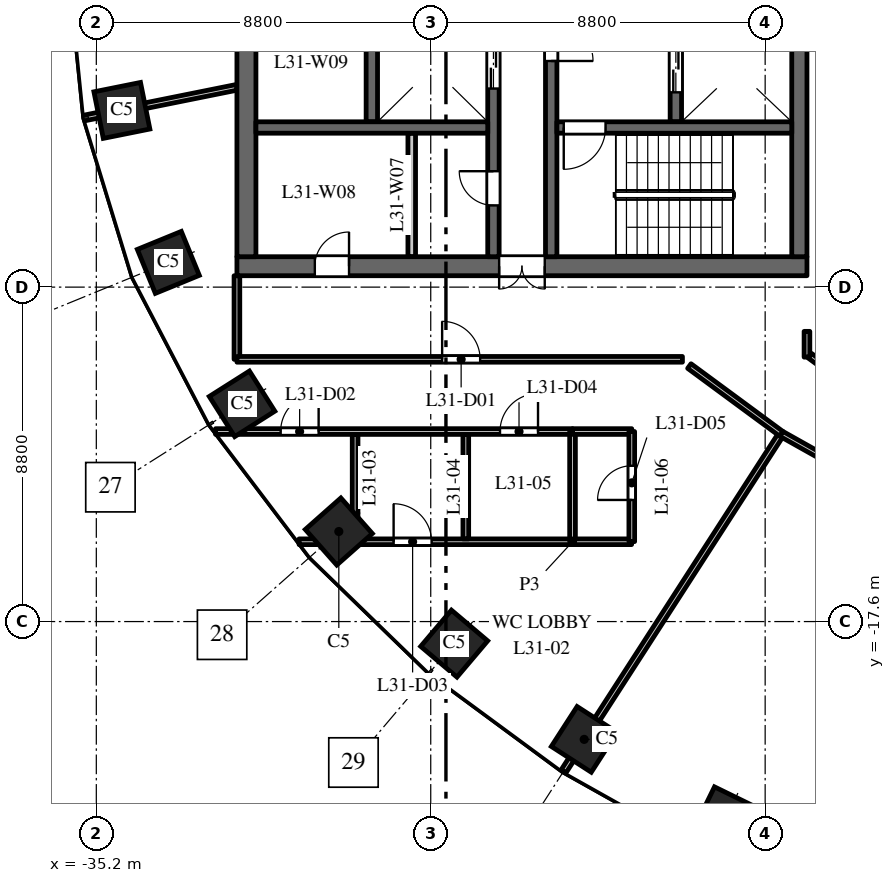
"""IFC4 building model, lengths in metres.
Left out: names, types, materials, properties, quantities, classifications, styles, units other than length and angle.
Written with IfcOpenShell. Run it as: python <this file> out.ifc"""

import sys

from ifc_helpers import new_model, si_unit, direction, frame, frame_2d, origin, origin_2d, place, context, subcontext, project, spatial, rectangle, extrude, element, fill, save


model = new_model("IFC4")
c1 = context("Model", 3, precision=1e-05, world=origin(), true_north=direction((0.0, 1.0)))
c2 = subcontext(c1, "Body", "Model", "MODEL_VIEW")
j1 = project(units=[si_unit("LENGTHUNIT", "METRE"), si_unit("PLANEANGLEUNIT", "RADIAN")], contexts=[c1])
p1 = place(None, origin())
s1 = spatial("IfcSite", under=j1, at=p1, CompositionType="ELEMENT")
p2 = place(p1, origin())
s2 = spatial("IfcBuilding", under=s1, at=p2, CompositionType="ELEMENT")
p3 = place(p2, frame((0.0, 0.0, 136.0)))
s3 = spatial("IfcBuildingStorey", under=s2, at=p3, CompositionType="ELEMENT", Elevation=136.0)
for number, where, z_axis, x_axis in (
    (1, (-34.527, -4.151, 0.0), (0.0, 0.0, 1.0), (0.197, -0.98, 0.0)),
    (2, (-33.305, -8.149, 0.0), (0.0, 0.0, 1.0), (0.379, -0.925, 0.0)),
    (3, (-31.365, -11.871, 0.0), (0.0, 0.0, 1.0), (0.535, -0.845, 0.0)),
    (4, (-28.819, -15.23, 0.0), (0.0, 0.0, 1.0), (0.663, -0.749, 0.0)),
    (5, (-25.783, -18.18, 0.0), (0.0, 0.0, 1.0), (0.763, -0.646, 0.0)),
    (6, (-22.362, -20.7, 0.0), (0.0, 0.0, 1.0), (0.84, -0.542, 0.0)),
    (7, (-18.646, -22.785, 0.0), (0.0, 0.0, 1.0), (0.898, -0.439, 0.0)),
):
    element("IfcColumn", number, at=place(p3, frame(where, z_axis=z_axis, x_axis=x_axis)), inside=s3, PredefinedType="COLUMN", context=c2, shape_type="SweptSolid", body=[
        extrude(rectangle(XDim=1.25, YDim=1.25, at=origin_2d()), origin(), (0.0, 0.0, 1.0), 4.0),
    ])
p4 = place(p3, frame((-16.5, -8.25, 0.0), z_axis=(0.0, 0.0, 1.0), x_axis=(-1.0, 0.0, 0.0)))
e8 = element("IfcWall", 8, at=p4, inside=s3, PredefinedType="SHEAR", context=c2, shape_type="SweptSolid", body=[
    extrude(rectangle(XDim=15.0, YDim=0.5, at=frame_2d((7.5, 0.0))), origin(), (0.0, 0.0, 1.0), 3.7),
])
p5 = place(p4, frame((6.9, 0.0, 0.0)))
e9 = element("IfcOpeningElement", 9, at=p5, cuts=e8, PredefinedType="OPENING", context=c2, shape_type="SweptSolid", body=[
    extrude(rectangle(XDim=1.2, YDim=2.1, at=frame_2d((0.6, 1.05))), frame((0.0, 0.26, 0.0), z_axis=(0.0, -1.0, 0.0), x_axis=(1.0, 0.0, 0.0)), (0.0, 0.0, 1.0), 0.52),
])
p6 = place(p4, frame((12.05, 0.0, 0.0)))
e10 = element("IfcOpeningElement", 10, at=p6, cuts=e8, PredefinedType="OPENING", context=c2, shape_type="SweptSolid", body=[
    extrude(rectangle(XDim=0.9, YDim=2.1, at=frame_2d((0.45, 1.05))), frame((0.0, 0.26, 0.0), z_axis=(0.0, -1.0, 0.0), x_axis=(1.0, 0.0, 0.0)), (0.0, 0.0, 1.0), 0.52),
])
p7 = place(p3, frame((-27.95, -4.45, 0.0), z_axis=(0.0, 0.0, 1.0), x_axis=(0.0, 1.0, 0.0)))
e11 = element("IfcWall", 11, at=p7, inside=s3, PredefinedType="SHEAR", context=c2, shape_type="SweptSolid", body=[
    extrude(rectangle(XDim=8.9, YDim=0.3, at=frame_2d((4.45, 0.0))), origin(), (0.0, 0.0, 1.0), 3.7),
])
p8 = place(p3, frame((-19.95, -4.45, 0.0), z_axis=(0.0, 0.0, 1.0), x_axis=(0.0, 1.0, 0.0)))
e12 = element("IfcWall", 12, at=p8, inside=s3, PredefinedType="SHEAR", context=c2, shape_type="SweptSolid", body=[
    extrude(rectangle(XDim=8.9, YDim=0.3, at=frame_2d((4.45, 0.0))), origin(), (0.0, 0.0, 1.0), 3.7),
])
p9 = place(p8, frame((0.775, 0.0, 0.0)))
e13 = element("IfcOpeningElement", 13, at=p9, cuts=e12, PredefinedType="OPENING", context=c2, shape_type="SweptSolid", body=[
    extrude(rectangle(XDim=1.2, YDim=2.1, at=frame_2d((0.6, 1.05))), frame((0.0, 0.16, 0.0), z_axis=(0.0, -1.0, 0.0), x_axis=(1.0, 0.0, 0.0)), (0.0, 0.0, 1.0), 0.32),
])
p10 = place(p8, frame((7.35, 0.0, 0.0)))
e14 = element("IfcOpeningElement", 14, at=p10, cuts=e12, PredefinedType="OPENING", context=c2, shape_type="SweptSolid", body=[
    extrude(rectangle(XDim=0.9, YDim=2.1, at=frame_2d((0.45, 1.05))), frame((0.0, 0.16, 0.0), z_axis=(0.0, -1.0, 0.0), x_axis=(1.0, 0.0, 0.0)), (0.0, 0.0, 1.0), 0.32),
])
p11 = place(p3, frame((-24.75, -8.0, 0.0), z_axis=(0.0, 0.0, 1.0), x_axis=(0.0, 1.0, 0.0)))
e15 = element("IfcWall", 15, at=p11, inside=s3, PredefinedType="SHEAR", context=c2, shape_type="SweptSolid", body=[
    extrude(rectangle(XDim=16.0, YDim=0.3, at=frame_2d((8.0, 0.0))), origin(), (0.0, 0.0, 1.0), 3.7),
])
p12 = place(p11, frame((4.425, 0.0, 0.0)))
e16 = element("IfcOpeningElement", 16, at=p12, cuts=e15, PredefinedType="OPENING", context=c2, shape_type="SweptSolid", body=[
    extrude(rectangle(XDim=1.1, YDim=2.1, at=frame_2d((0.55, 1.05))), frame((0.0, 0.16, 0.0), z_axis=(0.0, -1.0, 0.0), x_axis=(1.0, 0.0, 0.0)), (0.0, 0.0, 1.0), 0.32),
])
p13 = place(p11, frame((7.45, 0.0, 0.0)))
e17 = element("IfcOpeningElement", 17, at=p13, cuts=e15, PredefinedType="OPENING", context=c2, shape_type="SweptSolid", body=[
    extrude(rectangle(XDim=1.1, YDim=2.1, at=frame_2d((0.55, 1.05))), frame((0.0, 0.16, 0.0), z_axis=(0.0, -1.0, 0.0), x_axis=(1.0, 0.0, 0.0)), (0.0, 0.0, 1.0), 0.32),
])
p14 = place(p11, frame((10.425, 0.0, 0.0)))
e18 = element("IfcOpeningElement", 18, at=p14, cuts=e15, PredefinedType="OPENING", context=c2, shape_type="SweptSolid", body=[
    extrude(rectangle(XDim=1.2, YDim=2.1, at=frame_2d((0.6, 1.05))), frame((0.0, 0.16, 0.0), z_axis=(0.0, -1.0, 0.0), x_axis=(1.0, 0.0, 0.0)), (0.0, 0.0, 1.0), 0.32),
])
p15 = place(p11, frame((13.75, 0.0, 0.0)))
e19 = element("IfcOpeningElement", 19, at=p15, cuts=e15, PredefinedType="OPENING", context=c2, shape_type="SweptSolid", body=[
    extrude(rectangle(XDim=0.9, YDim=2.1, at=frame_2d((0.45, 1.05))), frame((0.0, 0.16, 0.0), z_axis=(0.0, -1.0, 0.0), x_axis=(1.0, 0.0, 0.0)), (0.0, 0.0, 1.0), 0.32),
])
p16 = place(p11, frame((1.35, 0.0, 0.0)))
e20 = element("IfcOpeningElement", 20, at=p16, cuts=e15, PredefinedType="OPENING", context=c2, shape_type="SweptSolid", body=[
    extrude(rectangle(XDim=0.9, YDim=2.1, at=frame_2d((0.45, 1.05))), frame((0.0, 0.16, 0.0), z_axis=(0.0, -1.0, 0.0), x_axis=(1.0, 0.0, 0.0)), (0.0, 0.0, 1.0), 0.32),
])
p17 = place(p3, frame((-16.7, -8.0, 0.0), z_axis=(0.0, 0.0, 1.0), x_axis=(0.0, 1.0, 0.0)))
e21 = element("IfcWall", 21, at=p17, inside=s3, PredefinedType="SHEAR", context=c2, shape_type="SweptSolid", body=[
    extrude(rectangle(XDim=16.0, YDim=0.4, at=frame_2d((8.0, 0.0))), origin(), (0.0, 0.0, 1.0), 3.7),
])
p18 = place(p3, frame((-31.25, -8.0, 0.0), z_axis=(0.0, 0.0, 1.0), x_axis=(0.0, 1.0, 0.0)))
e22 = element("IfcWall", 22, at=p18, inside=s3, PredefinedType="SHEAR", context=c2, shape_type="SweptSolid", body=[
    extrude(rectangle(XDim=16.0, YDim=0.5, at=frame_2d((8.0, 0.0))), origin(), (0.0, 0.0, 1.0), 3.7),
])
p19 = place(p3, frame((-26.9, -8.0, 0.0), z_axis=(0.0, 0.0, 1.0), x_axis=(0.0, 1.0, 0.0)))
e23 = element("IfcWall", 23, at=p19, inside=s3, PredefinedType="PARTITIONING", context=c2, shape_type="SweptSolid", body=[
    extrude(rectangle(XDim=3.25, YDim=0.2, at=frame_2d((1.625, 0.0))), origin(), (0.0, 0.0, 1.0), 3.7),
])
p20 = place(p3, frame((-24.9, -4.6, 0.0), z_axis=(0.0, 0.0, 1.0), x_axis=(-1.0, 0.0, 0.0)))
e24 = element("IfcWall", 24, at=p20, inside=s3, PredefinedType="SHEAR", context=c2, shape_type="SweptSolid", body=[
    extrude(rectangle(XDim=6.1, YDim=0.3, at=frame_2d((3.05, 0.0))), origin(), (0.0, 0.0, 1.0), 3.7),
])
p21 = place(p3, frame((-23.23, -8.0, 0.0), z_axis=(0.0, 0.0, 1.0), x_axis=(0.0, 1.0, 0.0)))
e25 = element("IfcWall", 25, at=p21, inside=s3, PredefinedType="SHEAR", context=c2, shape_type="SweptSolid", body=[
    extrude(rectangle(XDim=7.875, YDim=0.3, at=frame_2d((3.938, 0.0))), origin(), (0.0, 0.0, 1.0), 3.7),
])
p22 = place(p21, frame((5.15, 0.0, 0.0)))
e26 = element("IfcOpeningElement", 26, at=p22, cuts=e25, PredefinedType="OPENING", context=c2, shape_type="SweptSolid", body=[
    extrude(rectangle(XDim=1.1, YDim=2.1, at=frame_2d((0.55, 1.05))), frame((0.0, 0.16, 0.0), z_axis=(0.0, -1.0, 0.0), x_axis=(1.0, 0.0, 0.0)), (0.0, 0.0, 1.0), 0.32),
])
p23 = place(p3, frame((-16.9, -4.6, 0.0), z_axis=(0.0, 0.0, 1.0), x_axis=(-1.0, 0.0, 0.0)))
e27 = element("IfcWall", 27, at=p23, inside=s3, PredefinedType="SHEAR", context=c2, shape_type="SweptSolid", body=[
    extrude(rectangle(XDim=6.18, YDim=0.3, at=frame_2d((3.09, 0.0))), origin(), (0.0, 0.0, 1.0), 3.7),
])
p24 = place(p23, frame((4.9, 0.0, 0.0)))
e28 = element("IfcOpeningElement", 28, at=p24, cuts=e27, PredefinedType="OPENING", context=c2, shape_type="SweptSolid", body=[
    extrude(rectangle(XDim=1.1, YDim=2.1, at=frame_2d((0.55, 1.05))), frame((0.0, 0.16, 0.0), z_axis=(0.0, -1.0, 0.0), x_axis=(1.0, 0.0, 0.0)), (0.0, 0.0, 1.0), 0.32),
])
p25 = place(p3, frame((-35.512, -4.349, 0.0), z_axis=(0.0, 0.0, 1.0), x_axis=(0.980357474535, 0.197228857227, 0.0)))
e29 = element("IfcWall", 29, at=p25, inside=s3, PredefinedType="PARTITIONING", context=c2, shape_type="SweptSolid", body=[
    extrude(rectangle(XDim=4.092, YDim=0.15, at=frame_2d((2.046, 0.0))), origin(), (0.0, 0.0, 1.0), 3.2),
])
p26 = place(p3, frame((-32.063, -12.6, 0.0), z_axis=(0.0, 0.0, 1.0), x_axis=(1.0, 0.0, 0.0)))
e30 = element("IfcWall", 30, at=p26, inside=s3, PredefinedType="PARTITIONING", context=c2, shape_type="SweptSolid", body=[
    extrude(rectangle(XDim=9.394, YDim=0.15, at=frame_2d((4.697, 0.0))), origin(), (0.0, 0.0, 1.0), 2.9),
])
p27 = place(p26, frame((1.713, 0.0, 0.0)))
e31 = element("IfcOpeningElement", 31, at=p27, cuts=e30, PredefinedType="OPENING", context=c2, shape_type="SweptSolid", body=[
    extrude(rectangle(XDim=1.0, YDim=2.1, at=frame_2d((0.5, 1.05))), frame((0.0, 0.085, 0.0), z_axis=(0.0, -1.0, 0.0), x_axis=(1.0, 0.0, 0.0)), (0.0, 0.0, 1.0), 0.17),
])
p28 = place(p26, frame((7.486, 0.0, 0.0)))
e32 = element("IfcOpeningElement", 32, at=p28, cuts=e30, PredefinedType="OPENING", context=c2, shape_type="SweptSolid", body=[
    extrude(rectangle(XDim=1.0, YDim=2.1, at=frame_2d((0.5, 1.05))), frame((0.0, 0.085, 0.0), z_axis=(0.0, -1.0, 0.0), x_axis=(1.0, 0.0, 0.0)), (0.0, 0.0, 1.0), 0.17),
])
p29 = place(p3, frame((-31.5, -10.7, 0.0), z_axis=(0.0, 0.0, 1.0), x_axis=(0.0, 1.0, 0.0)))
e33 = element("IfcWall", 33, at=p29, inside=s3, PredefinedType="PARTITIONING", context=c2, shape_type="SweptSolid", body=[
    extrude(rectangle(XDim=2.2, YDim=0.15, at=frame_2d((1.1, 0.0))), origin(), (0.0, 0.0, 1.0), 3.7),
])
p30 = place(p3, frame((-31.5, -10.7, 0.0), z_axis=(0.0, 0.0, 1.0), x_axis=(1.0, 0.0, 0.0)))
e34 = element("IfcWall", 34, at=p30, inside=s3, PredefinedType="PARTITIONING", context=c2, shape_type="SweptSolid", body=[
    extrude(rectangle(XDim=11.723, YDim=0.15, at=frame_2d((5.861, 0.0))), origin(), (0.0, 0.0, 1.0), 3.1),
])
p31 = place(p30, frame((5.4, 0.0, 0.0)))
e35 = element("IfcOpeningElement", 35, at=p31, cuts=e34, PredefinedType="OPENING", context=c2, shape_type="SweptSolid", body=[
    extrude(rectangle(XDim=1.0, YDim=2.1, at=frame_2d((0.5, 1.05))), frame((0.0, 0.085, 0.0), z_axis=(0.0, -1.0, 0.0), x_axis=(1.0, 0.0, 0.0)), (0.0, 0.0, 1.0), 0.17),
])
p32 = place(p3, frame((-29.865, -15.5, 0.0), z_axis=(0.0, 0.0, 1.0), x_axis=(1.0, 0.0, 0.0)))
e36 = element("IfcWall", 36, at=p32, inside=s3, PredefinedType="PARTITIONING", context=c2, shape_type="SweptSolid", body=[
    extrude(rectangle(XDim=7.196, YDim=0.15, at=frame_2d((3.598, 0.0))), origin(), (0.0, 0.0, 1.0), 2.9),
])
p33 = place(p32, frame((2.488, 0.0, 0.0)))
e37 = element("IfcOpeningElement", 37, at=p33, cuts=e36, PredefinedType="OPENING", context=c2, shape_type="SweptSolid", body=[
    extrude(rectangle(XDim=1.0, YDim=2.1, at=frame_2d((0.5, 1.05))), frame((0.0, 0.085, 0.0), z_axis=(0.0, -1.0, 0.0), x_axis=(1.0, 0.0, 0.0)), (0.0, 0.0, 1.0), 0.17),
])
p34 = place(p3, frame((-28.39, -15.425, 0.0), z_axis=(0.0, 0.0, 1.0), x_axis=(0.0, 1.0, 0.0)))
e38 = element("IfcWall", 38, at=p34, inside=s3, PredefinedType="PARTITIONING", context=c2, shape_type="SweptSolid", body=[
    extrude(rectangle(XDim=2.75, YDim=0.15, at=frame_2d((1.375, 0.0))), origin(), (0.0, 0.0, 1.0), 2.9),
])
p35 = place(p3, frame((-25.477, -15.425, 0.0), z_axis=(0.0, 0.0, 1.0), x_axis=(0.0, 1.0, 0.0)))
e39 = element("IfcWall", 39, at=p35, inside=s3, PredefinedType="PARTITIONING", context=c2, shape_type="SweptSolid", body=[
    extrude(rectangle(XDim=2.75, YDim=0.15, at=frame_2d((1.375, 0.0))), origin(), (0.0, 0.0, 1.0), 3.7),
])
p36 = place(p3, frame((-22.905, -21.542, 0.0), z_axis=(0.0, 0.0, 1.0), x_axis=(0.542214233103, 0.840240278385, 0.0)))
e40 = element("IfcWall", 40, at=p36, inside=s3, PredefinedType="PARTITIONING", context=c2, shape_type="SweptSolid", body=[
    extrude(rectangle(XDim=10.566, YDim=0.15, at=frame_2d((5.283, 0.0))), origin(), (0.0, 0.0, 1.0), 2.9),
])
p37 = place(p3, frame((-22.669, -15.5, 0.0), z_axis=(0.0, 0.0, 1.0), x_axis=(0.0, 1.0, 0.0)))
e41 = element("IfcWall", 41, at=p37, inside=s3, PredefinedType="PARTITIONING", context=c2, shape_type="SweptSolid", body=[
    extrude(rectangle(XDim=2.9, YDim=0.15, at=frame_2d((1.45, 0.0))), origin(), (0.0, 0.0, 1.0), 3.7),
])
p38 = place(p3, frame((-22.669, -15.5, 0.0), z_axis=(0.0, 0.0, 1.0), x_axis=(1.0, 0.0, 0.0)))
e42 = element("IfcWall", 42, at=p38, inside=s3, PredefinedType="PARTITIONING", context=c2, shape_type="SweptSolid", body=[
    extrude(rectangle(XDim=1.555, YDim=0.15, at=frame_2d((0.777, 0.0))), origin(), (0.0, 0.0, 1.0), 2.75),
])
p39 = place(p3, frame((-22.669, -12.6, 0.0), z_axis=(0.0, 0.0, 1.0), x_axis=(1.0, 0.0, 0.0)))
e43 = element("IfcWall", 43, at=p39, inside=s3, PredefinedType="PARTITIONING", context=c2, shape_type="SweptSolid", body=[
    extrude(rectangle(XDim=1.559, YDim=0.15, at=frame_2d((0.779, 0.0))), origin(), (0.0, 0.0, 1.0), 3.7),
])
p40 = place(p3, frame((-21.11, -15.496, 0.0), z_axis=(0.0, 0.0, 1.0), x_axis=(0.0, 1.0, 0.0)))
e44 = element("IfcWall", 44, at=p40, inside=s3, PredefinedType="PARTITIONING", context=c2, shape_type="SweptSolid", body=[
    extrude(rectangle(XDim=2.896, YDim=0.15, at=frame_2d((1.448, 0.0))), origin(), (0.0, 0.0, 1.0), 2.75),
])
p41 = place(p40, frame((1.096, 0.0, 0.0)))
e45 = element("IfcOpeningElement", 45, at=p41, cuts=e44, PredefinedType="OPENING", context=c2, shape_type="SweptSolid", body=[
    extrude(rectangle(XDim=0.9, YDim=2.1, at=frame_2d((0.45, 1.05))), frame((0.0, 0.085, 0.0), z_axis=(0.0, -1.0, 0.0), x_axis=(1.0, 0.0, 0.0)), (0.0, 0.0, 1.0), 0.17),
])
p42 = place(p3, frame((-19.595, -10.877, 0.0), z_axis=(0.0, 0.0, 1.0), x_axis=(0.805151708762, -0.593068904831, 0.0)))
e46 = element("IfcWall", 46, at=p42, inside=s3, PredefinedType="PARTITIONING", context=c2, shape_type="SweptSolid", body=[
    extrude(rectangle(XDim=3.008, YDim=0.15, at=frame_2d((1.504, 0.0))), origin(), (0.0, 0.0, 1.0), 2.75),
])
p43 = place(p3, frame((-17.173, -12.661, 0.0), z_axis=(0.0, 0.0, 1.0), x_axis=(0.872054495499, -0.489408783003, 0.0)))
e47 = element("IfcWall", 47, at=p43, inside=s3, PredefinedType="PARTITIONING", context=c2, shape_type="SweptSolid", body=[
    extrude(rectangle(XDim=3.128, YDim=0.15, at=frame_2d((1.564, 0.0))), origin(), (0.0, 0.0, 1.0), 3.7),
])
p44 = place(p3, frame((-16.5, -10.642, 0.0), z_axis=(0.0, 0.0, 1.0), x_axis=(0.0, 1.0, 0.0)))
e48 = element("IfcWall", 48, at=p44, inside=s3, PredefinedType="PARTITIONING", context=c2, shape_type="SweptSolid", body=[
    extrude(rectangle(XDim=0.678, YDim=0.15, at=frame_2d((0.339, 0.0))), origin(), (0.0, 0.0, 1.0), 3.7),
])
p45 = place(p3, frame((-16.425, -10.604, 0.0), z_axis=(0.0, 0.0, 1.0), x_axis=(0.805608867586, -0.592447763492, 0.0)))
e49 = element("IfcWall", 49, at=p45, inside=s3, PredefinedType="PARTITIONING", context=c2, shape_type="SweptSolid", body=[
    extrude(rectangle(XDim=0.488, YDim=0.15, at=frame_2d((0.244, 0.0))), origin(), (0.0, 0.0, 1.0), 3.7),
])
p46 = place(p9, origin())
e50 = element("IfcDoor", 50, at=p46, inside=s3, OperationType="DOUBLE_DOOR_SLIDING", PredefinedType="DOOR", context=c2, shape_type="SweptSolid", body=[
    extrude(rectangle(XDim=1.2, YDim=2.1, at=frame_2d((0.6, 1.05))), frame((0.0, 0.025, 0.0), z_axis=(0.0, -1.0, 0.0), x_axis=(1.0, 0.0, 0.0)), (0.0, 0.0, 1.0), 0.05),
])
fill(e13, e50)
p47 = place(p12, origin())
e51 = element("IfcDoor", 51, at=p47, inside=s3, OperationType="DOUBLE_DOOR_SLIDING", PredefinedType="DOOR", context=c2, shape_type="SweptSolid", body=[
    extrude(rectangle(XDim=1.1, YDim=2.1, at=frame_2d((0.55, 1.05))), frame((0.0, 0.025, 0.0), z_axis=(0.0, -1.0, 0.0), x_axis=(1.0, 0.0, 0.0)), (0.0, 0.0, 1.0), 0.05),
])
fill(e16, e51)
p48 = place(p24, origin())
e52 = element("IfcDoor", 52, at=p48, inside=s3, OperationType="SINGLE_SWING_LEFT", PredefinedType="DOOR", context=c2, shape_type="SweptSolid", body=[
    extrude(rectangle(XDim=1.1, YDim=2.1, at=frame_2d((0.55, 1.05))), frame((0.0, 0.025, 0.0), z_axis=(0.0, -1.0, 0.0), x_axis=(1.0, 0.0, 0.0)), (0.0, 0.0, 1.0), 0.05),
])
fill(e28, e52)
p49 = place(p22, origin())
e53 = element("IfcDoor", 53, at=p49, inside=s3, OperationType="SINGLE_SWING_LEFT", PredefinedType="DOOR", context=c2, shape_type="SweptSolid", body=[
    extrude(rectangle(XDim=1.1, YDim=2.1, at=frame_2d((0.55, 1.05))), frame((0.0, 0.025, 0.0), z_axis=(0.0, -1.0, 0.0), x_axis=(1.0, 0.0, 0.0)), (0.0, 0.0, 1.0), 0.05),
])
fill(e26, e53)
p50 = place(p5, origin())
e54 = element("IfcDoor", 54, at=p50, inside=s3, OperationType="DOUBLE_DOOR_DOUBLE_SWING", PredefinedType="DOOR", context=c2, shape_type="SweptSolid", body=[
    extrude(rectangle(XDim=1.2, YDim=2.1, at=frame_2d((0.6, 1.05))), frame((0.0, 0.025, 0.0), z_axis=(0.0, -1.0, 0.0), x_axis=(1.0, 0.0, 0.0)), (0.0, 0.0, 1.0), 0.05),
])
fill(e9, e54)
p51 = place(p16, origin())
e55 = element("IfcDoor", 55, at=p51, inside=s3, OperationType="SINGLE_SWING_LEFT", PredefinedType="DOOR", context=c2, shape_type="SweptSolid", body=[
    extrude(rectangle(XDim=0.9, YDim=2.1, at=frame_2d((0.45, 1.05))), frame((0.0, 0.025, 0.0), z_axis=(0.0, -1.0, 0.0), x_axis=(1.0, 0.0, 0.0)), (0.0, 0.0, 1.0), 0.05),
])
fill(e20, e55)
p52 = place(p6, origin())
e56 = element("IfcDoor", 56, at=p52, inside=s3, OperationType="SINGLE_SWING_LEFT", PredefinedType="DOOR", context=c2, shape_type="SweptSolid", body=[
    extrude(rectangle(XDim=0.9, YDim=2.1, at=frame_2d((0.45, 1.05))), frame((0.0, 0.025, 0.0), z_axis=(0.0, -1.0, 0.0), x_axis=(1.0, 0.0, 0.0)), (0.0, 0.0, 1.0), 0.05),
])
fill(e10, e56)
p53 = place(p31, origin())
e57 = element("IfcDoor", 57, at=p53, inside=s3, OperationType="SINGLE_SWING_LEFT", PredefinedType="DOOR", context=c2, shape_type="SweptSolid", body=[
    extrude(rectangle(XDim=1.0, YDim=2.1, at=frame_2d((0.5, 1.05))), frame((0.0, 0.025, 0.0), z_axis=(0.0, -1.0, 0.0), x_axis=(1.0, 0.0, 0.0)), (0.0, 0.0, 1.0), 0.05),
])
fill(e35, e57)
p54 = place(p27, origin())
e58 = element("IfcDoor", 58, at=p54, inside=s3, OperationType="SINGLE_SWING_RIGHT", PredefinedType="DOOR", context=c2, shape_type="SweptSolid", body=[
    extrude(rectangle(XDim=1.0, YDim=2.1, at=frame_2d((0.5, 1.05))), frame((0.0, 0.025, 0.0), z_axis=(0.0, -1.0, 0.0), x_axis=(1.0, 0.0, 0.0)), (0.0, 0.0, 1.0), 0.05),
])
fill(e31, e58)
p55 = place(p33, origin())
e59 = element("IfcDoor", 59, at=p55, inside=s3, OperationType="SINGLE_SWING_LEFT", PredefinedType="DOOR", context=c2, shape_type="SweptSolid", body=[
    extrude(rectangle(XDim=1.0, YDim=2.1, at=frame_2d((0.5, 1.05))), frame((0.0, 0.025, 0.0), z_axis=(0.0, -1.0, 0.0), x_axis=(1.0, 0.0, 0.0)), (0.0, 0.0, 1.0), 0.05),
])
fill(e37, e59)
p56 = place(p28, origin())
e60 = element("IfcDoor", 60, at=p56, inside=s3, OperationType="SINGLE_SWING_RIGHT", PredefinedType="DOOR", context=c2, shape_type="SweptSolid", body=[
    extrude(rectangle(XDim=1.0, YDim=2.1, at=frame_2d((0.5, 1.05))), frame((0.0, 0.025, 0.0), z_axis=(0.0, -1.0, 0.0), x_axis=(1.0, 0.0, 0.0)), (0.0, 0.0, 1.0), 0.05),
])
fill(e32, e60)
p57 = place(p41, origin())
e61 = element("IfcDoor", 61, at=p57, inside=s3, OperationType="SINGLE_SWING_LEFT", PredefinedType="DOOR", context=c2, shape_type="SweptSolid", body=[
    extrude(rectangle(XDim=0.9, YDim=2.1, at=frame_2d((0.45, 1.05))), frame((0.0, 0.025, 0.0), z_axis=(0.0, -1.0, 0.0), x_axis=(1.0, 0.0, 0.0)), (0.0, 0.0, 1.0), 0.05),
])
fill(e45, e61)
save(model, sys.argv[1])
